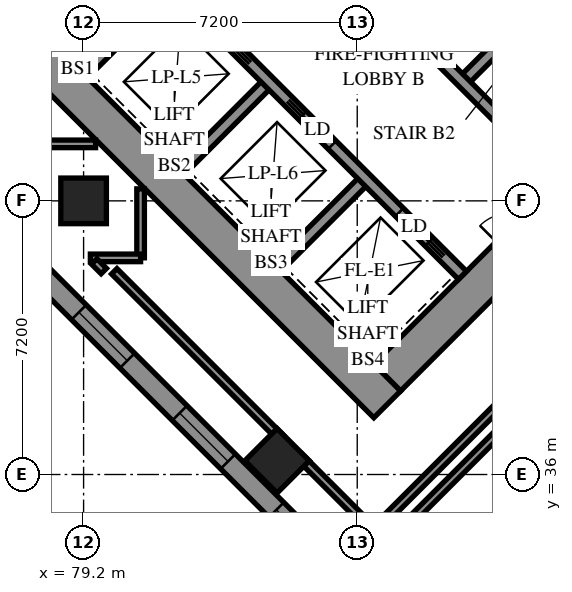
"""IFC4 building model, lengths in metres.
Left out: names, types, materials, properties, quantities, classifications, styles, units other than length and angle.
Written with IfcOpenShell. Run it as: python <this file> out.ifc"""

import sys

from ifc_helpers import new_model, si_unit, direction, frame, frame_2d, origin, origin_2d, place, context, subcontext, project, spatial, polyline, rectangle, outline, extrude, element, fill, save


model = new_model("IFC4")
c1 = context("Model", 3, precision=1e-05, world=origin(), true_north=direction((0.0, 1.0)))
c2 = subcontext(c1, "Body", "Model", "MODEL_VIEW")
j1 = project(units=[si_unit("LENGTHUNIT", "METRE"), si_unit("PLANEANGLEUNIT", "RADIAN")], contexts=[c1])
p1 = place(None, origin())
s1 = spatial("IfcSite", under=j1, at=p1, CompositionType="ELEMENT")
p2 = place(p1, origin())
s2 = spatial("IfcBuilding", under=s1, at=p2, CompositionType="ELEMENT")
p3 = place(p2, frame((0.0, 0.0, 10.2)))
s3 = spatial("IfcBuildingStorey", under=s2, at=p3, CompositionType="ELEMENT", Elevation=10.2)
for number, where, z_axis, x_axis in (
    (1, (79.2, 43.2, 0.0), (0.0, 0.0, 1.0), (1.0, 0.0, 0.0)),
    (2, (84.291, 36.362, 0.0), (0.0, 0.0, 1.0), (0.707, -0.707, 0.0)),
):
    element("IfcColumn", number, at=place(p3, frame(where, z_axis=z_axis, x_axis=x_axis)), inside=s3, PredefinedType="COLUMN", context=c2, shape_type="SweptSolid", body=[
        extrude(rectangle(XDim=1.2, YDim=1.2, at=origin_2d()), origin(), (0.0, 0.0, 1.0), 3.8),
    ])
p4 = place(p3, frame((75.594, 49.443, -0.4), z_axis=(0.0, 0.0, 1.0), x_axis=(0.7071037324, -0.70710983, 0.0)))
e3 = element("IfcWall", 3, at=p4, inside=s3, PredefinedType="SHEAR", context=c2, shape_type="SweptSolid", body=[
    extrude(rectangle(XDim=16.4, YDim=1.0, at=frame_2d((8.2, 0.0))), origin(), (0.0, 0.0, 1.0), 3.5),
])
p5 = place(p3, frame((87.19, 38.554, -0.4), z_axis=(0.0, 0.0, 1.0), x_axis=(0.707103309, 0.7071102534, 0.0)))
e4 = element("IfcWall", 4, at=p5, inside=s3, PredefinedType="SHEAR", context=c2, shape_type="SweptSolid", body=[
    extrude(rectangle(XDim=14.4, YDim=1.0, at=frame_2d((7.2, 0.0))), origin(), (0.0, 0.0, 1.0), 3.5),
])
p6 = place(p5, frame((4.55, 0.0, 0.4)))
e5 = element("IfcOpeningElement", 5, at=p6, cuts=e4, PredefinedType="OPENING", context=c2, shape_type="SweptSolid", body=[
    extrude(rectangle(XDim=1.1, YDim=2.1, at=frame_2d((0.55, 1.05))), frame((0.0, 0.51, 0.0), z_axis=(0.0, -1.0, 0.0), x_axis=(1.0, 0.0, 0.0)), (0.0, 0.0, 1.0), 1.02),
])
p7 = place(p5, frame((11.35, 0.0, 0.4)))
e6 = element("IfcOpeningElement", 6, at=p7, cuts=e4, PredefinedType="OPENING", context=c2, shape_type="SweptSolid", body=[
    extrude(rectangle(XDim=1.1, YDim=2.1, at=frame_2d((0.55, 1.05))), frame((0.0, 0.51, 0.0), z_axis=(0.0, -1.0, 0.0), x_axis=(1.0, 0.0, 0.0)), (0.0, 0.0, 1.0), 1.02),
])
p8 = place(p3, frame((79.2, 46.544, 0.0), z_axis=(0.0, 0.0, 1.0), x_axis=(0.7071219326, 0.7070916295, 0.0)))
e7 = element("IfcWall", 7, at=p8, inside=s3, PredefinedType="SOLIDWALL", context=c2, shape_type="SweptSolid", body=[
    extrude(rectangle(XDim=3.3, YDim=0.3, at=frame_2d((1.65, 0.0))), origin(), (0.0, 0.0, 1.0), 3.8),
])
for number, where, z_axis, x_axis in (
    (8, (81.746, 43.999, 0.0), (0.0, 0.0, 1.0), (0.707, 0.707, 0.0)),
    (9, (84.291, 41.453, 0.0), (0.0, 0.0, 1.0), (0.707, 0.707, 0.0)),
):
    element("IfcWall", number, at=place(p3, frame(where, z_axis=z_axis, x_axis=x_axis)), inside=s3, PredefinedType="SOLIDWALL", context=c2, shape_type="SweptSolid", body=[
        extrude(rectangle(XDim=3.3, YDim=0.3, at=frame_2d((1.65, 0.0))), origin(), (0.0, 0.0, 1.0), 3.8),
    ])
p9 = place(p3, frame((89.17, 46.332, 0.0), z_axis=(0.0, 0.0, 1.0), x_axis=(0.7071067812, 0.7071067812, 0.0)))
e10 = element("IfcWall", 10, at=p9, inside=s3, PredefinedType="SOLIDWALL", context=c2, shape_type="SweptSolid", body=[
    extrude(rectangle(XDim=3.3, YDim=0.3, at=frame_2d((1.65, 0.0))), origin(), (0.0, 0.0, 1.0), 3.8),
])
p10 = place(p3, frame((78.988, 51.423, 0.0), z_axis=(0.0, 0.0, 1.0), x_axis=(0.7071067812, -0.7071067812, 0.0)))
e11 = element("IfcWall", 11, at=p10, inside=s3, PredefinedType="SOLIDWALL", context=c2, shape_type="SweptSolid", body=[
    extrude(rectangle(XDim=14.4, YDim=0.3, at=frame_2d((7.2, 0.0))), origin(), (0.0, 0.0, 1.0), 3.8),
])
p11 = place(p10, frame((1.25, 0.0, 0.0)))
e12 = element("IfcOpeningElement", 12, at=p11, cuts=e11, PredefinedType="OPENING", context=c2, shape_type="SweptSolid", body=[
    extrude(rectangle(XDim=1.1, YDim=2.1, at=frame_2d((0.55, 1.05))), frame((0.0, 0.16, 0.0), z_axis=(0.0, -1.0, 0.0), x_axis=(1.0, 0.0, 0.0)), (0.0, 0.0, 1.0), 0.32),
])
p12 = place(p10, frame((4.85, 0.0, 0.0)))
e13 = element("IfcOpeningElement", 13, at=p12, cuts=e11, PredefinedType="OPENING", context=c2, shape_type="SweptSolid", body=[
    extrude(rectangle(XDim=1.1, YDim=2.1, at=frame_2d((0.55, 1.05))), frame((0.0, 0.16, 0.0), z_axis=(0.0, -1.0, 0.0), x_axis=(1.0, 0.0, 0.0)), (0.0, 0.0, 1.0), 0.32),
])
p13 = place(p10, frame((8.45, 0.0, 0.0)))
e14 = element("IfcOpeningElement", 14, at=p13, cuts=e11, PredefinedType="OPENING", context=c2, shape_type="SweptSolid", body=[
    extrude(rectangle(XDim=1.1, YDim=2.1, at=frame_2d((0.55, 1.05))), frame((0.0, 0.16, 0.0), z_axis=(0.0, -1.0, 0.0), x_axis=(1.0, 0.0, 0.0)), (0.0, 0.0, 1.0), 0.32),
])
p14 = place(p10, frame((12.05, 0.0, 0.0)))
e15 = element("IfcOpeningElement", 15, at=p14, cuts=e11, PredefinedType="OPENING", context=c2, shape_type="SweptSolid", body=[
    extrude(rectangle(XDim=1.1, YDim=2.1, at=frame_2d((0.55, 1.05))), frame((0.0, 0.16, 0.0), z_axis=(0.0, -1.0, 0.0), x_axis=(1.0, 0.0, 0.0)), (0.0, 0.0, 1.0), 0.32),
])
p15 = place(p3, frame((81.534, 53.969, 0.0), z_axis=(0.0, 0.0, 1.0), x_axis=(0.707103309, -0.7071102534, 0.0)))
e16 = element("IfcWall", 16, at=p15, inside=s3, PredefinedType="SOLIDWALL", context=c2, shape_type="SweptSolid", body=[
    extrude(rectangle(XDim=14.4, YDim=0.3, at=frame_2d((7.2, 0.0))), origin(), (0.0, 0.0, 1.0), 3.8),
])
p16 = place(p15, frame((12.05, 0.0, 0.0)))
e17 = element("IfcOpeningElement", 17, at=p16, cuts=e16, PredefinedType="OPENING", context=c2, shape_type="SweptSolid", body=[
    extrude(rectangle(XDim=1.1, YDim=2.1, at=frame_2d((0.55, 1.05))), frame((0.0, 0.16, 0.0), z_axis=(0.0, -1.0, 0.0), x_axis=(1.0, 0.0, 0.0)), (0.0, 0.0, 1.0), 0.32),
])
p17 = place(p3, frame((88.958, 51.211, 0.0), z_axis=(0.0, 0.0, 1.0), x_axis=(0.7070998367, -0.7071137256, 0.0)))
e18 = element("IfcWall", 18, at=p17, inside=s3, PredefinedType="SOLIDWALL", context=c2, shape_type="SweptSolid", body=[
    extrude(rectangle(XDim=7.2, YDim=0.3, at=frame_2d((3.6, 0.0))), origin(), (0.0, 0.0, 1.0), 3.8),
])
p18 = place(p3, frame((117.843, 34.665, 0.0), z_axis=(0.0, 0.0, 1.0), x_axis=(-0.7071067812, 0.7071067812, 0.0)))
e19 = element("IfcWall", 19, at=p18, inside=s3, PredefinedType="SOLIDWALL", context=c2, shape_type="SweptSolid", body=[
    extrude(outline(polyline([(-0.275, -0.275), (54.222, -0.275), (53.994, 0.275), (0.275, 0.275), (-0.275, -0.275)])), origin(), (0.0, 0.0, 1.0), 3.8),
])
p19 = place(p18, frame((0.8, 0.0, 0.7)))
e20 = element("IfcOpeningElement", 20, at=p19, cuts=e19, PredefinedType="OPENING", context=c2, shape_type="SweptSolid", body=[
    extrude(rectangle(XDim=1.8, YDim=2.6, at=frame_2d((0.9, 1.3))), frame((0.0, 0.285, 0.0), z_axis=(0.0, -1.0, 0.0), x_axis=(1.0, 0.0, 0.0)), (0.0, 0.0, 1.0), 0.57),
])
p20 = place(p18, frame((4.225, 0.0, 0.7)))
e21 = element("IfcOpeningElement", 21, at=p20, cuts=e19, PredefinedType="OPENING", context=c2, shape_type="SweptSolid", body=[
    extrude(rectangle(XDim=1.8, YDim=2.6, at=frame_2d((0.9, 1.3))), frame((0.0, 0.285, 0.0), z_axis=(0.0, -1.0, 0.0), x_axis=(1.0, 0.0, 0.0)), (0.0, 0.0, 1.0), 0.57),
])
p21 = place(p18, frame((7.825, 0.0, 0.7)))
e22 = element("IfcOpeningElement", 22, at=p21, cuts=e19, PredefinedType="OPENING", context=c2, shape_type="SweptSolid", body=[
    extrude(rectangle(XDim=1.8, YDim=2.6, at=frame_2d((0.9, 1.3))), frame((0.0, 0.285, 0.0), z_axis=(0.0, -1.0, 0.0), x_axis=(1.0, 0.0, 0.0)), (0.0, 0.0, 1.0), 0.57),
])
p22 = place(p18, frame((11.425, 0.0, 0.7)))
e23 = element("IfcOpeningElement", 23, at=p22, cuts=e19, PredefinedType="OPENING", context=c2, shape_type="SweptSolid", body=[
    extrude(rectangle(XDim=1.8, YDim=2.6, at=frame_2d((0.9, 1.3))), frame((0.0, 0.285, 0.0), z_axis=(0.0, -1.0, 0.0), x_axis=(1.0, 0.0, 0.0)), (0.0, 0.0, 1.0), 0.57),
])
p23 = place(p18, frame((15.025, 0.0, 0.7)))
e24 = element("IfcOpeningElement", 24, at=p23, cuts=e19, PredefinedType="OPENING", context=c2, shape_type="SweptSolid", body=[
    extrude(rectangle(XDim=1.8, YDim=2.6, at=frame_2d((0.9, 1.3))), frame((0.0, 0.285, 0.0), z_axis=(0.0, -1.0, 0.0), x_axis=(1.0, 0.0, 0.0)), (0.0, 0.0, 1.0), 0.57),
])
p24 = place(p18, frame((18.625, 0.0, 0.7)))
e25 = element("IfcOpeningElement", 25, at=p24, cuts=e19, PredefinedType="OPENING", context=c2, shape_type="SweptSolid", body=[
    extrude(rectangle(XDim=1.8, YDim=2.6, at=frame_2d((0.9, 1.3))), frame((0.0, 0.285, 0.0), z_axis=(0.0, -1.0, 0.0), x_axis=(1.0, 0.0, 0.0)), (0.0, 0.0, 1.0), 0.57),
])
p25 = place(p18, frame((22.225, 0.0, 0.7)))
e26 = element("IfcOpeningElement", 26, at=p25, cuts=e19, PredefinedType="OPENING", context=c2, shape_type="SweptSolid", body=[
    extrude(rectangle(XDim=1.8, YDim=2.6, at=frame_2d((0.9, 1.3))), frame((0.0, 0.285, 0.0), z_axis=(0.0, -1.0, 0.0), x_axis=(1.0, 0.0, 0.0)), (0.0, 0.0, 1.0), 0.57),
])
p26 = place(p18, frame((25.825, 0.0, 0.7)))
e27 = element("IfcOpeningElement", 27, at=p26, cuts=e19, PredefinedType="OPENING", context=c2, shape_type="SweptSolid", body=[
    extrude(rectangle(XDim=1.8, YDim=2.6, at=frame_2d((0.9, 1.3))), frame((0.0, 0.285, 0.0), z_axis=(0.0, -1.0, 0.0), x_axis=(1.0, 0.0, 0.0)), (0.0, 0.0, 1.0), 0.57),
])
p27 = place(p18, frame((29.425, 0.0, 0.7)))
e28 = element("IfcOpeningElement", 28, at=p27, cuts=e19, PredefinedType="OPENING", context=c2, shape_type="SweptSolid", body=[
    extrude(rectangle(XDim=1.8, YDim=2.6, at=frame_2d((0.9, 1.3))), frame((0.0, 0.285, 0.0), z_axis=(0.0, -1.0, 0.0), x_axis=(1.0, 0.0, 0.0)), (0.0, 0.0, 1.0), 0.57),
])
p28 = place(p18, frame((33.025, 0.0, 0.7)))
e29 = element("IfcOpeningElement", 29, at=p28, cuts=e19, PredefinedType="OPENING", context=c2, shape_type="SweptSolid", body=[
    extrude(rectangle(XDim=1.8, YDim=2.6, at=frame_2d((0.9, 1.3))), frame((0.0, 0.285, 0.0), z_axis=(0.0, -1.0, 0.0), x_axis=(1.0, 0.0, 0.0)), (0.0, 0.0, 1.0), 0.57),
])
p29 = place(p18, frame((36.625, 0.0, 0.7)))
e30 = element("IfcOpeningElement", 30, at=p29, cuts=e19, PredefinedType="OPENING", context=c2, shape_type="SweptSolid", body=[
    extrude(rectangle(XDim=1.8, YDim=2.6, at=frame_2d((0.9, 1.3))), frame((0.0, 0.285, 0.0), z_axis=(0.0, -1.0, 0.0), x_axis=(1.0, 0.0, 0.0)), (0.0, 0.0, 1.0), 0.57),
])
p30 = place(p18, frame((40.225, 0.0, 0.7)))
e31 = element("IfcOpeningElement", 31, at=p30, cuts=e19, PredefinedType="OPENING", context=c2, shape_type="SweptSolid", body=[
    extrude(rectangle(XDim=1.8, YDim=2.6, at=frame_2d((0.9, 1.3))), frame((0.0, 0.285, 0.0), z_axis=(0.0, -1.0, 0.0), x_axis=(1.0, 0.0, 0.0)), (0.0, 0.0, 1.0), 0.57),
])
p31 = place(p18, frame((43.825, 0.0, 0.7)))
e32 = element("IfcOpeningElement", 32, at=p31, cuts=e19, PredefinedType="OPENING", context=c2, shape_type="SweptSolid", body=[
    extrude(rectangle(XDim=1.8, YDim=2.6, at=frame_2d((0.9, 1.3))), frame((0.0, 0.285, 0.0), z_axis=(0.0, -1.0, 0.0), x_axis=(1.0, 0.0, 0.0)), (0.0, 0.0, 1.0), 0.57),
])
p32 = place(p18, frame((47.425, 0.0, 0.7)))
e33 = element("IfcOpeningElement", 33, at=p32, cuts=e19, PredefinedType="OPENING", context=c2, shape_type="SweptSolid", body=[
    extrude(rectangle(XDim=1.8, YDim=2.6, at=frame_2d((0.9, 1.3))), frame((0.0, 0.285, 0.0), z_axis=(0.0, -1.0, 0.0), x_axis=(1.0, 0.0, 0.0)), (0.0, 0.0, 1.0), 0.57),
])
p33 = place(p18, frame((50.96, 0.0, 0.7)))
e34 = element("IfcOpeningElement", 34, at=p33, cuts=e19, PredefinedType="OPENING", context=c2, shape_type="SweptSolid", body=[
    extrude(rectangle(XDim=1.8, YDim=2.6, at=frame_2d((0.9, 1.3))), frame((0.0, 0.285, 0.0), z_axis=(0.0, -1.0, 0.0), x_axis=(1.0, 0.0, 0.0)), (0.0, 0.0, 1.0), 0.57),
])
p34 = place(p3, frame((77.07, 42.275, 0.0), z_axis=(0.0, 0.0, 1.0), x_axis=(0.7071067812, -0.7071067812, 0.0)))
e35 = element("IfcWall", 35, at=p34, inside=s3, PredefinedType="SOLIDWALL", context=c2, shape_type="SweptSolid", body=[
    extrude(outline(polyline([(0.114, -0.275), (39.288, -0.275), (38.737, 0.275), (-0.114, 0.275), (0.114, -0.275)])), origin(), (0.0, 0.0, 1.0), 3.8),
])
p35 = place(p34, frame((2.837, 0.0, 0.7)))
e36 = element("IfcOpeningElement", 36, at=p35, cuts=e35, PredefinedType="OPENING", context=c2, shape_type="SweptSolid", body=[
    extrude(rectangle(XDim=1.8, YDim=2.6, at=frame_2d((0.9, 1.3))), frame((0.0, 0.285, 0.0), z_axis=(0.0, -1.0, 0.0), x_axis=(1.0, 0.0, 0.0)), (0.0, 0.0, 1.0), 0.57),
])
p36 = place(p34, frame((6.588, 0.0, 0.7)))
e37 = element("IfcOpeningElement", 37, at=p36, cuts=e35, PredefinedType="OPENING", context=c2, shape_type="SweptSolid", body=[
    extrude(rectangle(XDim=1.8, YDim=2.6, at=frame_2d((0.9, 1.3))), frame((0.0, 0.285, 0.0), z_axis=(0.0, -1.0, 0.0), x_axis=(1.0, 0.0, 0.0)), (0.0, 0.0, 1.0), 0.57),
])
p37 = place(p34, frame((10.188, 0.0, 0.7)))
e38 = element("IfcOpeningElement", 38, at=p37, cuts=e35, PredefinedType="OPENING", context=c2, shape_type="SweptSolid", body=[
    extrude(rectangle(XDim=1.8, YDim=2.6, at=frame_2d((0.9, 1.3))), frame((0.0, 0.285, 0.0), z_axis=(0.0, -1.0, 0.0), x_axis=(1.0, 0.0, 0.0)), (0.0, 0.0, 1.0), 0.57),
])
p38 = place(p34, frame((13.787, 0.0, 0.7)))
e39 = element("IfcOpeningElement", 39, at=p38, cuts=e35, PredefinedType="OPENING", context=c2, shape_type="SweptSolid", body=[
    extrude(rectangle(XDim=1.8, YDim=2.6, at=frame_2d((0.9, 1.3))), frame((0.0, 0.285, 0.0), z_axis=(0.0, -1.0, 0.0), x_axis=(1.0, 0.0, 0.0)), (0.0, 0.0, 1.0), 0.57),
])
p39 = place(p34, frame((17.387, 0.0, 0.7)))
e40 = element("IfcOpeningElement", 40, at=p39, cuts=e35, PredefinedType="OPENING", context=c2, shape_type="SweptSolid", body=[
    extrude(rectangle(XDim=1.8, YDim=2.6, at=frame_2d((0.9, 1.3))), frame((0.0, 0.285, 0.0), z_axis=(0.0, -1.0, 0.0), x_axis=(1.0, 0.0, 0.0)), (0.0, 0.0, 1.0), 0.57),
])
p40 = place(p34, frame((20.988, 0.0, 0.7)))
e41 = element("IfcOpeningElement", 41, at=p40, cuts=e35, PredefinedType="OPENING", context=c2, shape_type="SweptSolid", body=[
    extrude(rectangle(XDim=1.8, YDim=2.6, at=frame_2d((0.9, 1.3))), frame((0.0, 0.285, 0.0), z_axis=(0.0, -1.0, 0.0), x_axis=(1.0, 0.0, 0.0)), (0.0, 0.0, 1.0), 0.57),
])
p41 = place(p34, frame((24.587, 0.0, 0.7)))
e42 = element("IfcOpeningElement", 42, at=p41, cuts=e35, PredefinedType="OPENING", context=c2, shape_type="SweptSolid", body=[
    extrude(rectangle(XDim=1.8, YDim=2.6, at=frame_2d((0.9, 1.3))), frame((0.0, 0.285, 0.0), z_axis=(0.0, -1.0, 0.0), x_axis=(1.0, 0.0, 0.0)), (0.0, 0.0, 1.0), 0.57),
])
p42 = place(p34, frame((28.188, 0.0, 0.7)))
e43 = element("IfcOpeningElement", 43, at=p42, cuts=e35, PredefinedType="OPENING", context=c2, shape_type="SweptSolid", body=[
    extrude(rectangle(XDim=1.8, YDim=2.6, at=frame_2d((0.9, 1.3))), frame((0.0, 0.285, 0.0), z_axis=(0.0, -1.0, 0.0), x_axis=(1.0, 0.0, 0.0)), (0.0, 0.0, 1.0), 0.57),
])
p43 = place(p34, frame((31.788, 0.0, 0.7)))
e44 = element("IfcOpeningElement", 44, at=p43, cuts=e35, PredefinedType="OPENING", context=c2, shape_type="SweptSolid", body=[
    extrude(rectangle(XDim=1.8, YDim=2.6, at=frame_2d((0.9, 1.3))), frame((0.0, 0.285, 0.0), z_axis=(0.0, -1.0, 0.0), x_axis=(1.0, 0.0, 0.0)), (0.0, 0.0, 1.0), 0.57),
])
p44 = place(p34, frame((35.388, 0.0, 0.7)))
e45 = element("IfcOpeningElement", 45, at=p44, cuts=e35, PredefinedType="OPENING", context=c2, shape_type="SweptSolid", body=[
    extrude(rectangle(XDim=1.8, YDim=2.6, at=frame_2d((0.9, 1.3))), frame((0.0, 0.285, 0.0), z_axis=(0.0, -1.0, 0.0), x_axis=(1.0, 0.0, 0.0)), (0.0, 0.0, 1.0), 0.57),
])
p45 = place(p3, frame((86.376, 33.357, 0.0), z_axis=(0.0, 0.0, 1.0), x_axis=(0.7071019736, 0.7071115887, 0.0)))
e46 = element("IfcWall", 46, at=p45, inside=s3, PredefinedType="PARTITIONING", context=c2, shape_type="SweptSolid", body=[
    extrude(rectangle(XDim=10.4, YDim=0.2, at=frame_2d((5.2, 0.0))), origin(), (0.0, 0.0, 1.0), 3.8),
])
p46 = place(p3, frame((86.836, 34.524, 0.0), z_axis=(0.0, 0.0, 1.0), x_axis=(0.7071067812, 0.7071067812, 0.0)))
e47 = element("IfcWall", 47, at=p46, inside=s3, PredefinedType="PARTITIONING", context=c2, shape_type="SweptSolid", body=[
    extrude(rectangle(XDim=9.249, YDim=0.2, at=frame_2d((4.625, 0.0))), origin(), (0.0, 0.0, 1.0), 3.8),
])
p47 = place(p3, frame((80.007, 41.347, 0.0), z_axis=(0.0, 0.0, 1.0), x_axis=(0.7071067812, -0.7071067812, 0.0)))
e48 = element("IfcWall", 48, at=p47, inside=s3, PredefinedType="PARTITIONING", context=c2, shape_type="SweptSolid", body=[
    extrude(rectangle(XDim=6.206, YDim=0.2, at=frame_2d((3.103, 0.0))), origin(), (0.0, 0.0, 1.0), 3.8),
])
p48 = place(p3, frame((84.889, 36.465, 0.0), z_axis=(0.0, 0.0, 1.0), x_axis=(0.7071067812, -0.7071067812, 0.0)))
e49 = element("IfcWall", 49, at=p48, inside=s3, PredefinedType="PARTITIONING", context=c2, shape_type="SweptSolid", body=[
    extrude(rectangle(XDim=2.749, YDim=0.2, at=frame_2d((1.375, 0.0))), origin(), (0.0, 0.0, 1.0), 3.8),
])
for number, where, z_axis, x_axis in (
    (50, (77.702, 44.7, 0.0), (0.0, 0.0, 1.0), (1.0, 0.0, 0.0)),
    (51, (80.7, 41.702, 0.0), (0.0, 0.0, 1.0), (0.0, 1.0, 0.0)),
):
    element("IfcWall", number, at=place(p3, frame(where, z_axis=z_axis, x_axis=x_axis)), inside=s3, PredefinedType="PARTITIONING", context=c2, shape_type="SweptSolid", body=[
        extrude(rectangle(XDim=1.814, YDim=0.2, at=frame_2d((0.907, 0.0))), origin(), (0.0, 0.0, 1.0), 3.8),
    ])
p49 = place(p3, frame((79.378, 41.7, 0.0), z_axis=(0.0, 0.0, 1.0), x_axis=(1.0, 0.0, 0.0)))
e52 = element("IfcWall", 52, at=p49, inside=s3, PredefinedType="PARTITIONING", context=c2, shape_type="SweptSolid", body=[
    extrude(rectangle(XDim=1.322, YDim=0.2, at=frame_2d((0.661, 0.0))), origin(), (0.0, 0.0, 1.0), 3.8),
])
p50 = place(p3, frame((79.481, 41.605, 0.0), z_axis=(0.0, 0.0, 1.0), x_axis=(0.7071067812, -0.7071067812, 0.0)))
e53 = element("IfcWall", 53, at=p50, inside=s3, PredefinedType="PARTITIONING", context=c2, shape_type="SweptSolid", body=[
    extrude(rectangle(XDim=0.355, YDim=0.2, at=frame_2d((0.177, 0.0))), origin(), (0.0, 0.0, 1.0), 3.8),
])
p51 = place(p35, origin())
e54 = element("IfcWindow", 54, at=p51, inside=s3, PartitioningType="SINGLE_PANEL", PredefinedType="WINDOW", context=c2, shape_type="SweptSolid", body=[
    extrude(rectangle(XDim=1.8, YDim=2.6, at=frame_2d((0.9, 1.3))), frame((0.0, 0.155, 0.0), z_axis=(0.0, -1.0, 0.0), x_axis=(1.0, 0.0, 0.0)), (0.0, 0.0, 1.0), 0.06),
])
fill(e36, e54)
p52 = place(p36, origin())
e55 = element("IfcWindow", 55, at=p52, inside=s3, PartitioningType="SINGLE_PANEL", PredefinedType="WINDOW", context=c2, shape_type="SweptSolid", body=[
    extrude(rectangle(XDim=1.8, YDim=2.6, at=frame_2d((0.9, 1.3))), frame((0.0, 0.155, 0.0), z_axis=(0.0, -1.0, 0.0), x_axis=(1.0, 0.0, 0.0)), (0.0, 0.0, 1.0), 0.06),
])
fill(e37, e55)
p53 = place(p37, origin())
e56 = element("IfcWindow", 56, at=p53, inside=s3, PartitioningType="SINGLE_PANEL", PredefinedType="WINDOW", context=c2, shape_type="SweptSolid", body=[
    extrude(rectangle(XDim=1.8, YDim=2.6, at=frame_2d((0.9, 1.3))), frame((0.0, 0.155, 0.0), z_axis=(0.0, -1.0, 0.0), x_axis=(1.0, 0.0, 0.0)), (0.0, 0.0, 1.0), 0.06),
])
fill(e38, e56)
p54 = place(p13, origin())
e57 = element("IfcDoor", 57, at=p54, inside=s3, OperationType="SLIDING_TO_LEFT", PredefinedType="DOOR", context=c2, shape_type="SweptSolid", body=[
    extrude(rectangle(XDim=1.1, YDim=2.1, at=frame_2d((0.55, 1.05))), frame((0.0, 0.025, 0.0), z_axis=(0.0, -1.0, 0.0), x_axis=(1.0, 0.0, 0.0)), (0.0, 0.0, 1.0), 0.05),
])
fill(e14, e57)
p55 = place(p14, origin())
e58 = element("IfcDoor", 58, at=p55, inside=s3, OperationType="SLIDING_TO_RIGHT", PredefinedType="DOOR", context=c2, shape_type="SweptSolid", body=[
    extrude(rectangle(XDim=1.1, YDim=2.1, at=frame_2d((0.55, 1.05))), frame((0.0, 0.025, 0.0), z_axis=(0.0, -1.0, 0.0), x_axis=(1.0, 0.0, 0.0)), (0.0, 0.0, 1.0), 0.05),
])
fill(e15, e58)
save(model, sys.argv[1])
